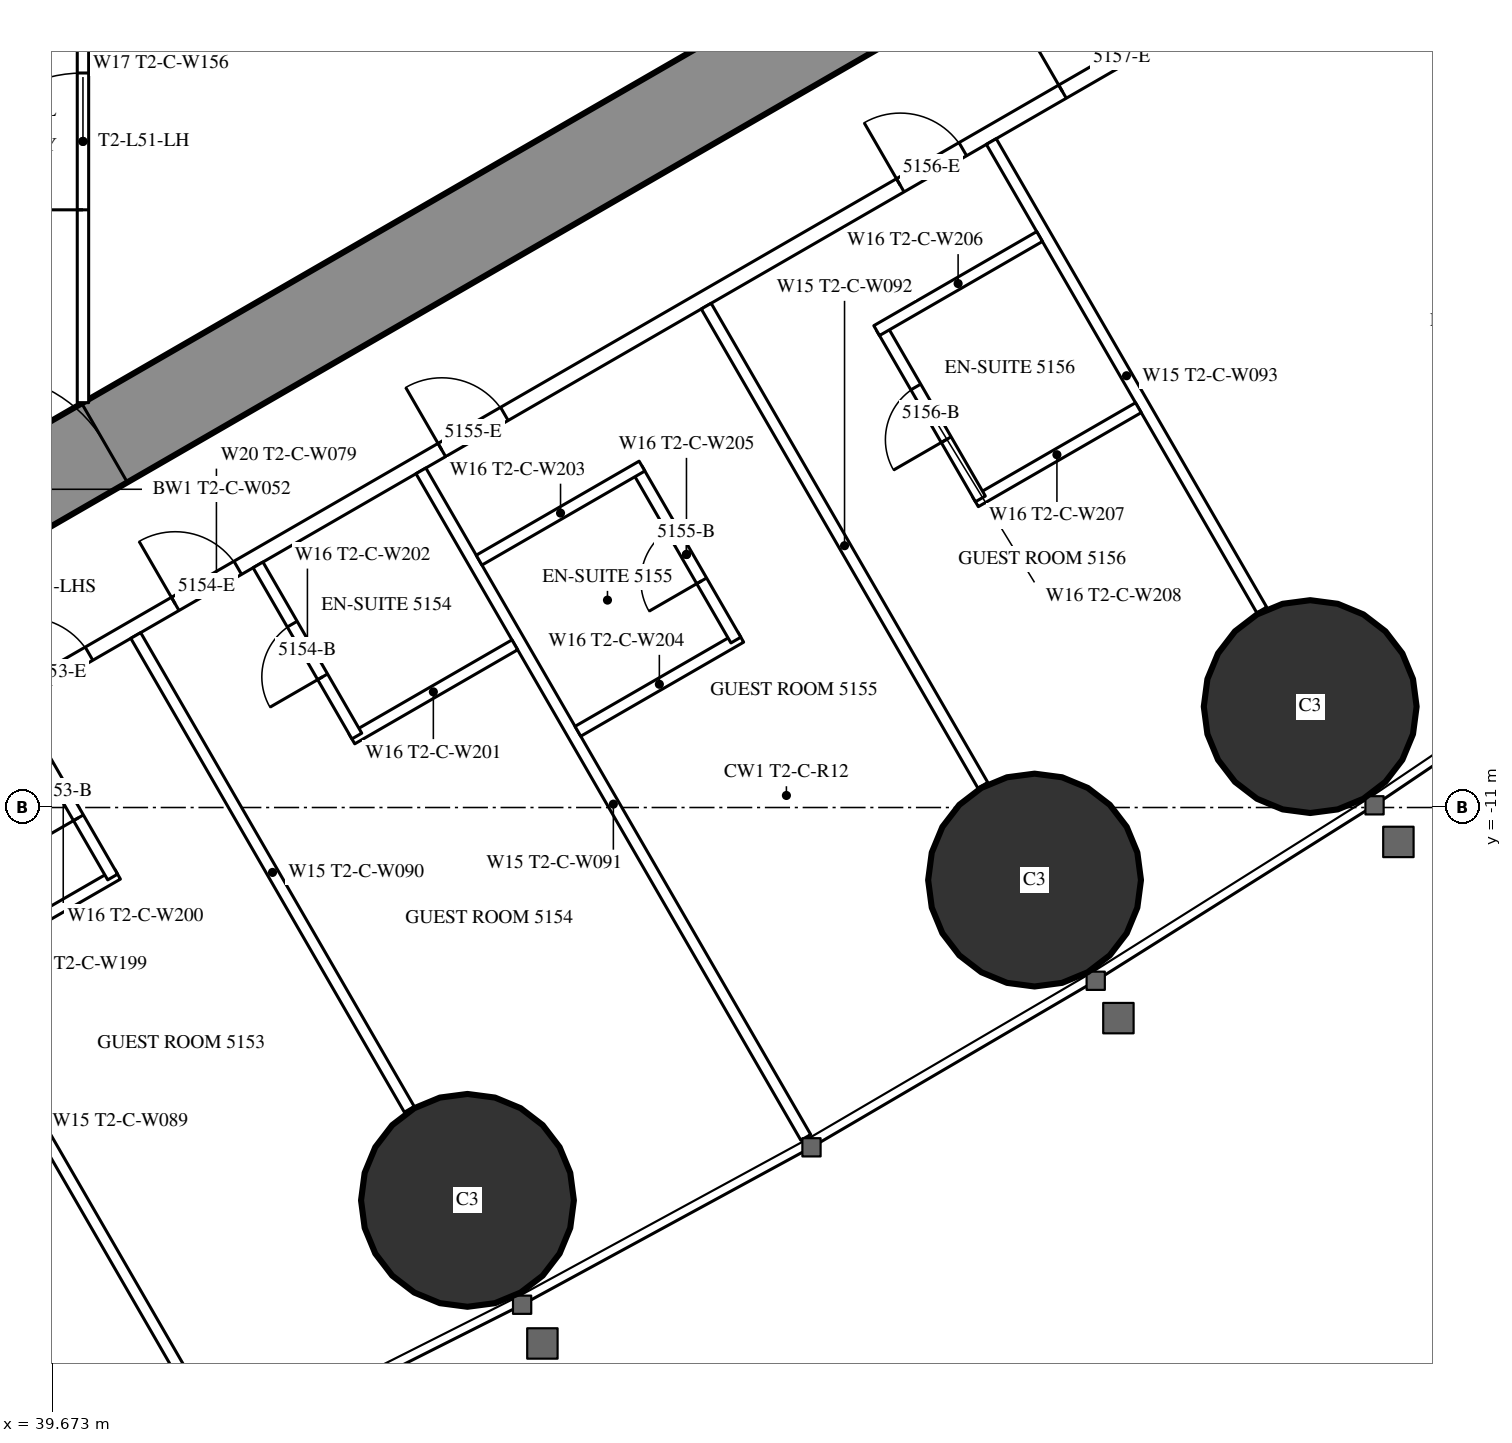
"""IFC4 building model, lengths in metres.
Left out: names, types, materials, properties, quantities, classifications, styles, units other than length and angle.
Written with IfcOpenShell. Run it as: python <this file> out.ifc"""

import sys

from ifc_helpers import new_model, si_unit, direction, frame, frame_2d, origin, origin_2d, place, context, subcontext, project, spatial, rectangle, circle, extrude, element, fill, save


model = new_model("IFC4")
c1 = context("Model", 3, precision=1e-05, world=origin(), true_north=direction((0.0, 1.0)))
c2 = subcontext(c1, "Body", "Model", "MODEL_VIEW")
j1 = project(units=[si_unit("LENGTHUNIT", "METRE"), si_unit("PLANEANGLEUNIT", "RADIAN")], contexts=[c1])
p1 = place(None, origin())
s1 = spatial("IfcSite", under=j1, at=p1, CompositionType="ELEMENT")
p2 = place(p1, origin())
s2 = spatial("IfcBuilding", under=s1, at=p2, CompositionType="ELEMENT")
p3 = place(p2, frame((0.0, 0.0, 191.3)))
s3 = spatial("IfcBuildingStorey", under=s2, at=p3, CompositionType="ELEMENT", Elevation=191.3)
for number, where, z_axis, x_axis in (
    (1, (45.134, -16.168, 0.0), (0.0, 0.0, 1.0), (1.0, 0.0, 0.0)),
    (2, (52.594, -11.955, 0.0), (0.0, 0.0, 1.0), (1.0, 0.0, 0.0)),
    (3, (56.221, -9.672, 0.0), (0.0, 0.0, 1.0), (1.0, 0.0, 0.0)),
):
    element("IfcColumn", number, at=place(p3, frame(where, z_axis=z_axis, x_axis=x_axis)), inside=s3, PredefinedType="COLUMN", context=c2, shape_type="SweptSolid", body=[
        extrude(circle(Radius=1.4, at=origin_2d()), origin(), (0.0, 0.0, 1.0), 3.5),
    ])
p4 = place(p3, frame((27.2, -13.8, 0.0), z_axis=(0.0, 0.0, 1.0), x_axis=(0.866027159892, 0.499996958321, 0.0)))
e4 = element("IfcWall", 4, at=p4, inside=s3, PredefinedType="SHEAR", context=c2, shape_type="SweptSolid", body=[
    extrude(rectangle(XDim=27.947, YDim=1.2, at=frame_2d((13.973, 0.0))), origin(), (0.0, 0.0, 1.0), 3.5),
])
p5 = place(p4, frame((4.6, 0.0, 0.0)))
e5 = element("IfcOpeningElement", 5, at=p5, cuts=e4, PredefinedType="OPENING", context=c2, shape_type="SweptSolid", body=[
    extrude(rectangle(XDim=1.0, YDim=2.2, at=frame_2d((0.5, 1.1))), frame((0.0, 0.61, 0.0), z_axis=(0.0, -1.0, 0.0), x_axis=(1.0, 0.0, 0.0)), (0.0, 0.0, 1.0), 1.22),
])
p6 = place(p4, frame((13.395, 0.0, 0.0)))
e6 = element("IfcOpeningElement", 6, at=p6, cuts=e4, PredefinedType="OPENING", context=c2, shape_type="SweptSolid", body=[
    extrude(rectangle(XDim=1.8, YDim=2.2, at=frame_2d((0.9, 1.1))), frame((0.0, 0.61, 0.0), z_axis=(0.0, -1.0, 0.0), x_axis=(1.0, 0.0, 0.0)), (0.0, 0.0, 1.0), 1.22),
])
p7 = place(p3, frame((27.959, -16.017, 0.0), z_axis=(0.0, 0.0, 1.0), x_axis=(0.866024151371, 0.500002169237, 0.0)))
e7 = element("IfcWall", 7, at=p7, inside=s3, PredefinedType="PARTITIONING", context=c2, shape_type="SweptSolid", body=[
    extrude(rectangle(XDim=32.034, YDim=0.2, at=frame_2d((16.017, 0.0))), origin(), (0.0, 0.0, 1.0), 3.25),
])
p8 = place(p7, frame((0.6, 0.0, 0.0)))
e8 = element("IfcOpeningElement", 8, at=p8, cuts=e7, PredefinedType="OPENING", context=c2, shape_type="SweptSolid", body=[
    extrude(rectangle(XDim=0.95, YDim=2.2, at=frame_2d((0.475, 1.1))), frame((0.0, 0.11, 0.0), z_axis=(0.0, -1.0, 0.0), x_axis=(1.0, 0.0, 0.0)), (0.0, 0.0, 1.0), 0.22),
])
p9 = place(p7, frame((13.132, 0.0, 0.0)))
e9 = element("IfcOpeningElement", 9, at=p9, cuts=e7, PredefinedType="OPENING", context=c2, shape_type="SweptSolid", body=[
    extrude(rectangle(XDim=0.95, YDim=2.2, at=frame_2d((0.475, 1.1))), frame((0.0, 0.11, 0.0), z_axis=(0.0, -1.0, 0.0), x_axis=(1.0, 0.0, 0.0)), (0.0, 0.0, 1.0), 0.22),
])
p10 = place(p7, frame((15.391, 0.0, 0.0)))
e10 = element("IfcOpeningElement", 10, at=p10, cuts=e7, PredefinedType="OPENING", context=c2, shape_type="SweptSolid", body=[
    extrude(rectangle(XDim=0.95, YDim=2.2, at=frame_2d((0.475, 1.1))), frame((0.0, 0.11, 0.0), z_axis=(0.0, -1.0, 0.0), x_axis=(1.0, 0.0, 0.0)), (0.0, 0.0, 1.0), 0.22),
])
p11 = place(p7, frame((19.441, 0.0, 0.0)))
e11 = element("IfcOpeningElement", 11, at=p11, cuts=e7, PredefinedType="OPENING", context=c2, shape_type="SweptSolid", body=[
    extrude(rectangle(XDim=0.95, YDim=2.2, at=frame_2d((0.475, 1.1))), frame((0.0, 0.11, 0.0), z_axis=(0.0, -1.0, 0.0), x_axis=(1.0, 0.0, 0.0)), (0.0, 0.0, 1.0), 0.22),
])
p12 = place(p7, frame((26.406, 0.0, 0.0)))
e12 = element("IfcOpeningElement", 12, at=p12, cuts=e7, PredefinedType="OPENING", context=c2, shape_type="SweptSolid", body=[
    extrude(rectangle(XDim=0.95, YDim=2.2, at=frame_2d((0.475, 1.1))), frame((0.0, 0.11, 0.0), z_axis=(0.0, -1.0, 0.0), x_axis=(1.0, 0.0, 0.0)), (0.0, 0.0, 1.0), 0.22),
])
p13 = place(p7, frame((28.87, 0.0, 0.0)))
e13 = element("IfcOpeningElement", 13, at=p13, cuts=e7, PredefinedType="OPENING", context=c2, shape_type="SweptSolid", body=[
    extrude(rectangle(XDim=1.8, YDim=2.2, at=frame_2d((0.9, 1.1))), frame((0.0, 0.11, 0.0), z_axis=(0.0, -1.0, 0.0), x_axis=(1.0, 0.0, 0.0)), (0.0, 0.0, 1.0), 0.22),
])
p14 = place(p3, frame((37.022, -10.9, 0.0), z_axis=(0.0, 0.0, 1.0), x_axis=(0.499998620953, -0.866026199976, 0.0)))
e14 = element("IfcWall", 14, at=p14, inside=s3, PredefinedType="PARTITIONING", context=c2, shape_type="SweptSolid", body=[
    extrude(rectangle(XDim=9.77, YDim=0.15, at=frame_2d((4.885, 0.0))), origin(), (0.0, 0.0, 1.0), 3.25),
])
p15 = place(p3, frame((40.769, -8.737, 0.0), z_axis=(0.0, 0.0, 1.0), x_axis=(0.500013115284, -0.866017831539, 0.0)))
e15 = element("IfcWall", 15, at=p15, inside=s3, PredefinedType="PARTITIONING", context=c2, shape_type="SweptSolid", body=[
    extrude(rectangle(XDim=7.198, YDim=0.15, at=frame_2d((3.599, 0.0))), origin(), (0.0, 0.0, 1.0), 2.3),
])
p16 = place(p3, frame((44.521, -6.571, 0.0), z_axis=(0.0, 0.0, 1.0), x_axis=(0.500010457486, -0.866019366068, 0.0)))
e16 = element("IfcWall", 16, at=p16, inside=s3, PredefinedType="PARTITIONING", context=c2, shape_type="SweptSolid", body=[
    extrude(rectangle(XDim=10.126, YDim=0.15, at=frame_2d((5.063, 0.0))), origin(), (0.0, 0.0, 1.0), 3.25),
])
p17 = place(p3, frame((48.275, -4.404, 0.0), z_axis=(0.0, 0.0, 1.0), x_axis=(0.500006004368, -0.866021937133, 0.0)))
e17 = element("IfcWall", 17, at=p17, inside=s3, PredefinedType="PARTITIONING", context=c2, shape_type="SweptSolid", body=[
    extrude(rectangle(XDim=7.279, YDim=0.15, at=frame_2d((3.64, 0.0))), origin(), (0.0, 0.0, 1.0), 2.3),
])
p18 = place(p3, frame((52.025, -2.238, 0.0), z_axis=(0.0, 0.0, 1.0), x_axis=(0.499983785035, -0.866034765296, 0.0)))
e18 = element("IfcWall", 18, at=p18, inside=s3, PredefinedType="PARTITIONING", context=c2, shape_type="SweptSolid", body=[
    extrude(rectangle(XDim=7.116, YDim=0.15, at=frame_2d((3.558, 0.0))), origin(), (0.0, 0.0, 1.0), 2.3),
])
p19 = place(p3, frame((38.387, -13.115, 0.0), z_axis=(0.0, 0.0, 1.0), x_axis=(0.866073894602, 0.499916002032, 0.0)))
e19 = element("IfcWall", 19, at=p19, inside=s3, PredefinedType="PARTITIONING", context=c2, shape_type="SweptSolid", body=[
    extrude(rectangle(XDim=2.475, YDim=0.15, at=frame_2d((1.238, 0.0))), origin(), (0.0, 0.0, 1.0), 3.25),
])
p20 = place(p3, frame((39.166, -9.663, 0.0), z_axis=(0.0, 0.0, 1.0), x_axis=(0.500006934395, -0.866021400173, 0.0)))
e20 = element("IfcWall", 20, at=p20, inside=s3, PredefinedType="PARTITIONING", context=c2, shape_type="SweptSolid", body=[
    extrude(rectangle(XDim=2.6, YDim=0.15, at=frame_2d((1.3, 0.0))), origin(), (0.0, 0.0, 1.0), 3.25),
])
p21 = place(p20, frame((0.9, 0.0, 0.0)))
e21 = element("IfcOpeningElement", 21, at=p21, cuts=e20, PredefinedType="OPENING", context=c2, shape_type="SweptSolid", body=[
    extrude(rectangle(XDim=0.8, YDim=2.2, at=frame_2d((0.4, 1.1))), frame((0.0, 0.085, 0.0), z_axis=(0.0, -1.0, 0.0), x_axis=(1.0, 0.0, 0.0)), (0.0, 0.0, 1.0), 0.17),
])
p22 = place(p3, frame((43.613, -10.097, 0.0), z_axis=(0.0, 0.0, 1.0), x_axis=(0.866031185235, 0.4999899861, 0.0)))
e22 = element("IfcWall", 22, at=p22, inside=s3, PredefinedType="PARTITIONING", context=c2, shape_type="SweptSolid", body=[
    extrude(rectangle(XDim=2.475, YDim=0.15, at=frame_2d((1.238, 0.0))), origin(), (0.0, 0.0, 1.0), 3.25),
])
p23 = place(p3, frame((42.378, -7.808, 0.0), z_axis=(0.0, 0.0, 1.0), x_axis=(0.500006934395, -0.866021400173, 0.0)))
e23 = element("IfcWall", 23, at=p23, inside=s3, PredefinedType="PARTITIONING", context=c2, shape_type="SweptSolid", body=[
    extrude(rectangle(XDim=2.6, YDim=0.15, at=frame_2d((1.3, 0.0))), origin(), (0.0, 0.0, 1.0), 3.25),
])
p24 = place(p23, frame((0.9, 0.0, 0.0)))
e24 = element("IfcOpeningElement", 24, at=p24, cuts=e23, PredefinedType="OPENING", context=c2, shape_type="SweptSolid", body=[
    extrude(rectangle(XDim=0.8, YDim=2.2, at=frame_2d((0.4, 1.1))), frame((0.0, 0.085, 0.0), z_axis=(0.0, -1.0, 0.0), x_axis=(1.0, 0.0, 0.0)), (0.0, 0.0, 1.0), 0.17),
])
p25 = place(p3, frame((46.586, -9.997, 0.0), z_axis=(0.0, 0.0, 1.0), x_axis=(0.866006523861, 0.500032699561, 0.0)))
e25 = element("IfcWall", 25, at=p25, inside=s3, PredefinedType="PARTITIONING", context=c2, shape_type="SweptSolid", body=[
    extrude(rectangle(XDim=2.475, YDim=0.15, at=frame_2d((1.237, 0.0))), origin(), (0.0, 0.0, 1.0), 3.25),
])
p26 = place(p3, frame((47.365, -6.546, 0.0), z_axis=(0.0, 0.0, 1.0), x_axis=(0.500006934395, -0.866021400173, 0.0)))
e26 = element("IfcWall", 26, at=p26, inside=s3, PredefinedType="PARTITIONING", context=c2, shape_type="SweptSolid", body=[
    extrude(rectangle(XDim=2.6, YDim=0.15, at=frame_2d((1.3, 0.0))), origin(), (0.0, 0.0, 1.0), 3.25),
])
p27 = place(p26, frame((0.9, 0.0, 0.0)))
e27 = element("IfcOpeningElement", 27, at=p27, cuts=e26, PredefinedType="OPENING", context=c2, shape_type="SweptSolid", body=[
    extrude(rectangle(XDim=0.8, YDim=2.2, at=frame_2d((0.4, 1.1))), frame((0.0, 0.085, 0.0), z_axis=(0.0, -1.0, 0.0), x_axis=(1.0, 0.0, 0.0)), (0.0, 0.0, 1.0), 0.17),
])
for number, where, z_axis, x_axis in (
    (28, (45.286, -7.746, 0.0), (0.0, 0.0, 1.0), (0.866, 0.5, 0.0)),
    (29, (51.817, -6.978, 0.0), (0.0, 0.0, 1.0), (0.866, 0.5, 0.0)),
):
    element("IfcWall", number, at=place(p3, frame(where, z_axis=z_axis, x_axis=x_axis)), inside=s3, PredefinedType="PARTITIONING", context=c2, shape_type="SweptSolid", body=[
        extrude(rectangle(XDim=2.475, YDim=0.15, at=frame_2d((1.237, 0.0))), origin(), (0.0, 0.0, 1.0), 3.25),
    ])
p28 = place(p3, frame((50.582, -4.688, 0.0), z_axis=(0.0, 0.0, 1.0), x_axis=(0.500006934395, -0.866021400173, 0.0)))
e30 = element("IfcWall", 30, at=p28, inside=s3, PredefinedType="PARTITIONING", context=c2, shape_type="SweptSolid", body=[
    extrude(rectangle(XDim=2.6, YDim=0.15, at=frame_2d((1.3, 0.0))), origin(), (0.0, 0.0, 1.0), 3.25),
])
p29 = place(p28, frame((0.9, 0.0, 0.0)))
e31 = element("IfcOpeningElement", 31, at=p29, cuts=e30, PredefinedType="OPENING", context=c2, shape_type="SweptSolid", body=[
    extrude(rectangle(XDim=0.8, YDim=2.2, at=frame_2d((0.4, 1.1))), frame((0.0, 0.085, 0.0), z_axis=(0.0, -1.0, 0.0), x_axis=(1.0, 0.0, 0.0)), (0.0, 0.0, 1.0), 0.17),
])
p30 = place(p3, frame((50.517, -4.726, 0.0), z_axis=(0.0, 0.0, 1.0), x_axis=(0.866031185235, 0.4999899861, 0.0)))
e32 = element("IfcWall", 32, at=p30, inside=s3, PredefinedType="PARTITIONING", context=c2, shape_type="SweptSolid", body=[
    extrude(rectangle(XDim=2.475, YDim=0.15, at=frame_2d((1.238, 0.0))), origin(), (0.0, 0.0, 1.0), 3.25),
])
p31 = place(p3, frame((40.075, -5.674, 0.0), z_axis=(0.0, 0.0, 1.0), x_axis=(0.0, 1.0, 0.0)))
e33 = element("IfcWall", 33, at=p31, inside=s3, PredefinedType="PARTITIONING", context=c2, shape_type="SweptSolid", body=[
    extrude(rectangle(XDim=6.874, YDim=0.15, at=frame_2d((3.437, 0.0))), origin(), (0.0, 0.0, 1.0), 3.25),
])
p32 = place(p31, frame((2.537, 0.0, 0.0)))
e34 = element("IfcOpeningElement", 34, at=p32, cuts=e33, PredefinedType="OPENING", context=c2, shape_type="SweptSolid", body=[
    extrude(rectangle(XDim=1.8, YDim=2.2, at=frame_2d((0.9, 1.1))), frame((0.0, 0.085, 0.0), z_axis=(0.0, -1.0, 0.0), x_axis=(1.0, 0.0, 0.0)), (0.0, 0.0, 1.0), 0.17),
])
p33 = place(p21, origin())
e35 = element("IfcDoor", 35, at=p33, inside=s3, OperationType="SINGLE_SWING_RIGHT", PredefinedType="DOOR", context=c2, shape_type="SweptSolid", body=[
    extrude(rectangle(XDim=0.8, YDim=2.2, at=frame_2d((0.4, 1.1))), frame((0.0, 0.025, 0.0), z_axis=(0.0, -1.0, 0.0), x_axis=(1.0, 0.0, 0.0)), (0.0, 0.0, 1.0), 0.05),
])
fill(e21, e35)
p34 = place(p9, origin())
e36 = element("IfcDoor", 36, at=p34, inside=s3, OperationType="SINGLE_SWING_LEFT", PredefinedType="DOOR", context=c2, shape_type="SweptSolid", body=[
    extrude(rectangle(XDim=0.95, YDim=2.2, at=frame_2d((0.475, 1.1))), frame((0.0, 0.025, 0.0), z_axis=(0.0, -1.0, 0.0), x_axis=(1.0, 0.0, 0.0)), (0.0, 0.0, 1.0), 0.05),
])
fill(e9, e36)
p35 = place(p24, origin())
e37 = element("IfcDoor", 37, at=p35, inside=s3, OperationType="SINGLE_SWING_RIGHT", PredefinedType="DOOR", context=c2, shape_type="SweptSolid", body=[
    extrude(rectangle(XDim=0.8, YDim=2.2, at=frame_2d((0.4, 1.1))), frame((0.0, 0.025, 0.0), z_axis=(0.0, -1.0, 0.0), x_axis=(1.0, 0.0, 0.0)), (0.0, 0.0, 1.0), 0.05),
])
fill(e24, e37)
p36 = place(p10, origin())
e38 = element("IfcDoor", 38, at=p36, inside=s3, OperationType="SINGLE_SWING_LEFT", PredefinedType="DOOR", context=c2, shape_type="SweptSolid", body=[
    extrude(rectangle(XDim=0.95, YDim=2.2, at=frame_2d((0.475, 1.1))), frame((0.0, 0.025, 0.0), z_axis=(0.0, -1.0, 0.0), x_axis=(1.0, 0.0, 0.0)), (0.0, 0.0, 1.0), 0.05),
])
fill(e10, e38)
p37 = place(p27, origin())
e39 = element("IfcDoor", 39, at=p37, inside=s3, OperationType="SINGLE_SWING_RIGHT", PredefinedType="DOOR", context=c2, shape_type="SweptSolid", body=[
    extrude(rectangle(XDim=0.8, YDim=2.2, at=frame_2d((0.4, 1.1))), frame((0.0, 0.025, 0.0), z_axis=(0.0, -1.0, 0.0), x_axis=(1.0, 0.0, 0.0)), (0.0, 0.0, 1.0), 0.05),
])
fill(e27, e39)
p38 = place(p11, origin())
e40 = element("IfcDoor", 40, at=p38, inside=s3, OperationType="SINGLE_SWING_LEFT", PredefinedType="DOOR", context=c2, shape_type="SweptSolid", body=[
    extrude(rectangle(XDim=0.95, YDim=2.2, at=frame_2d((0.475, 1.1))), frame((0.0, 0.025, 0.0), z_axis=(0.0, -1.0, 0.0), x_axis=(1.0, 0.0, 0.0)), (0.0, 0.0, 1.0), 0.05),
])
fill(e11, e40)
p39 = place(p29, origin())
e41 = element("IfcDoor", 41, at=p39, inside=s3, OperationType="SINGLE_SWING_RIGHT", PredefinedType="DOOR", context=c2, shape_type="SweptSolid", body=[
    extrude(rectangle(XDim=0.8, YDim=2.2, at=frame_2d((0.4, 1.1))), frame((0.0, 0.025, 0.0), z_axis=(0.0, -1.0, 0.0), x_axis=(1.0, 0.0, 0.0)), (0.0, 0.0, 1.0), 0.05),
])
fill(e31, e41)
p40 = place(p12, origin())
e42 = element("IfcDoor", 42, at=p40, inside=s3, OperationType="SINGLE_SWING_LEFT", PredefinedType="DOOR", context=c2, shape_type="SweptSolid", body=[
    extrude(rectangle(XDim=0.95, YDim=2.2, at=frame_2d((0.475, 1.1))), frame((0.0, 0.025, 0.0), z_axis=(0.0, -1.0, 0.0), x_axis=(1.0, 0.0, 0.0)), (0.0, 0.0, 1.0), 0.05),
])
fill(e12, e42)
p41 = place(p13, origin())
e43 = element("IfcDoor", 43, at=p41, inside=s3, OperationType="DOUBLE_DOOR_SINGLE_SWING", PredefinedType="DOOR", context=c2, shape_type="SweptSolid", body=[
    extrude(rectangle(XDim=1.8, YDim=2.2, at=frame_2d((0.9, 1.1))), frame((0.0, 0.025, 0.0), z_axis=(0.0, -1.0, 0.0), x_axis=(1.0, 0.0, 0.0)), (0.0, 0.0, 1.0), 0.05),
])
fill(e13, e43)
p42 = place(p32, origin())
e44 = element("IfcDoor", 44, at=p42, inside=s3, OperationType="DOUBLE_DOOR_SINGLE_SWING", PredefinedType="DOOR", context=c2, shape_type="SweptSolid", body=[
    extrude(rectangle(XDim=1.8, YDim=2.2, at=frame_2d((0.9, 1.1))), frame((0.0, 0.025, 0.0), z_axis=(0.0, -1.0, 0.0), x_axis=(1.0, 0.0, 0.0)), (0.0, 0.0, 1.0), 0.05),
])
fill(e34, e44)
p43 = place(p6, origin())
e45 = element("IfcDoor", 45, at=p43, inside=s3, OperationType="DOUBLE_DOOR_SINGLE_SWING", PredefinedType="DOOR", context=c2, shape_type="SweptSolid", body=[
    extrude(rectangle(XDim=1.8, YDim=2.2, at=frame_2d((0.9, 1.1))), frame((0.0, 0.025, 0.0), z_axis=(0.0, -1.0, 0.0), x_axis=(1.0, 0.0, 0.0)), (0.0, 0.0, 1.0), 0.05),
])
fill(e6, e45)
save(model, sys.argv[1])
